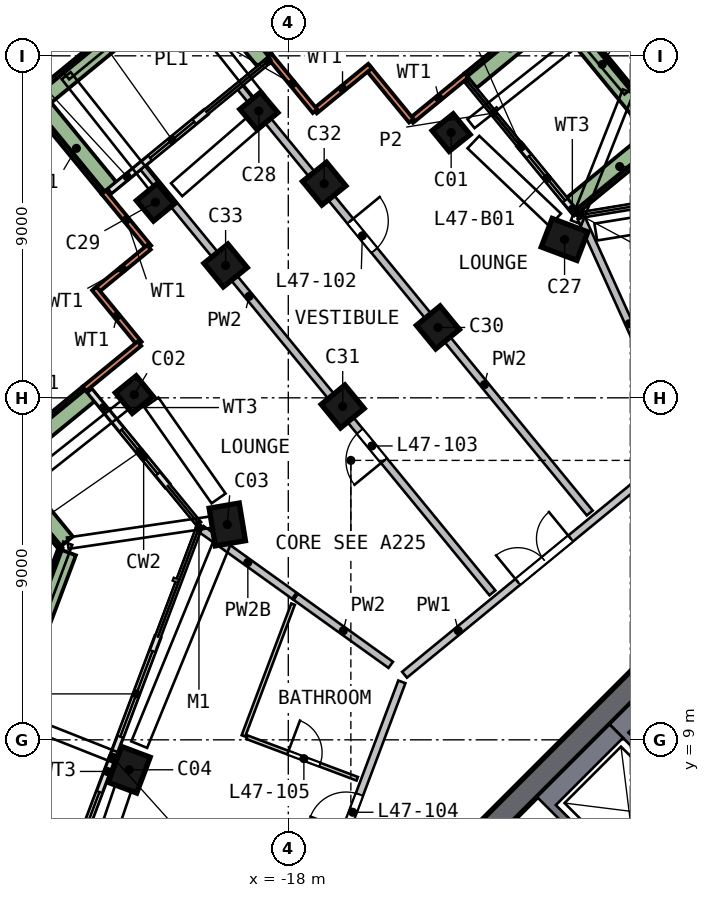
"""IFC4 building model, lengths in metres.
Left out: names, types, materials, properties, quantities, classifications, styles, units other than length and angle.
Written with IfcOpenShell. Run it as: python <this file> out.ifc"""

import sys

from ifc_helpers import new_model, si_unit, direction, frame, frame_2d, origin, origin_2d, place, context, subcontext, project, spatial, polyline, rectangle, outline, extrude, element, fill, save


model = new_model("IFC4")
c1 = context("Model", 3, precision=1e-05, world=origin(), true_north=direction((0.0, 1.0)))
c2 = subcontext(c1, "Body", "Model", "MODEL_VIEW")
j1 = project(units=[si_unit("LENGTHUNIT", "METRE"), si_unit("PLANEANGLEUNIT", "RADIAN")], contexts=[c1])
p1 = place(None, origin())
s1 = spatial("IfcSite", under=j1, at=p1, CompositionType="ELEMENT")
p2 = place(p1, origin())
s2 = spatial("IfcBuilding", under=s1, at=p2, CompositionType="ELEMENT")
p3 = place(p2, frame((0.0, 0.0, 194.0)))
s3 = spatial("IfcBuildingStorey", under=s2, at=p3, CompositionType="ELEMENT", Elevation=194.0)
p4 = place(p3, frame((-13.515, 24.992, 0.0), z_axis=(-0.163974568, -0.009965305, 0.98641423), x_axis=(-0.62120179, 0.777821307, -0.095406236)))
e1 = element("IfcColumn", 1, at=p4, inside=s3, PredefinedType="COLUMN", context=c2, shape_type="SweptSolid", body=[
    extrude(rectangle(XDim=0.7, YDim=0.7, at=origin_2d()), origin(), (0.0, 0.0, 1.0), 3.234),
])
p5 = place(p3, frame((-21.894, 18.145, 0.0), z_axis=(-0.131843016, -0.049479017, 0.990034972), x_axis=(0.628924315, -0.77616525, 0.044963447)))
e2 = element("IfcColumn", 2, at=p5, inside=s3, PredefinedType="COLUMN", context=c2, shape_type="SweptSolid", body=[
    extrude(rectangle(XDim=0.7, YDim=0.7, at=origin_2d()), origin(), (0.0, 0.0, 1.0), 3.222),
])
p6 = place(p3, frame((-19.521, 14.78, 0.0), z_axis=(-0.069476843, -0.093421269, 0.993199595), x_axis=(-0.169022074, 0.982313293, 0.080573769)))
e3 = element("IfcColumn", 3, at=p6, inside=s3, PredefinedType="COLUMN", context=c2, shape_type="SweptSolid", body=[
    extrude(rectangle(XDim=1.0, YDim=0.8, at=origin_2d()), origin(), (0.0, 0.0, 1.0), 3.212),
])
p7 = place(p3, frame((-22.14, 8.339, 0.0), z_axis=(-0.038784697, -0.105631262, 0.993648722), x_axis=(-0.350385276, -0.929821941, -0.112522514)))
e4 = element("IfcColumn", 4, at=p7, inside=s3, PredefinedType="COLUMN", context=c2, shape_type="SweptSolid", body=[
    extrude(rectangle(XDim=1.0, YDim=0.8, at=origin_2d()), origin(), (0.0, 0.0, 1.0), 3.21),
])
p8 = place(p3, frame((-10.603, 22.23, 0.0), z_axis=(-0.105270942, -0.051305333, 0.993119223), x_axis=(0.930381174, -0.35772673, 0.080140241)))
e5 = element("IfcColumn", 5, at=p8, inside=s3, PredefinedType="COLUMN", context=c2, shape_type="SweptSolid", body=[
    extrude(rectangle(XDim=1.0, YDim=0.8, at=origin_2d()), origin(), (0.0, 0.0, 1.0), 3.212),
])
p9 = place(p3, frame((-18.572, 25.591, 0.0), z_axis=(-0.166383559, -0.033865013, 0.985479412), x_axis=(-0.756669368, -0.636446663, -0.149623234)))
e6 = element("IfcColumn", 6, at=p9, inside=s3, PredefinedType="COLUMN", context=c2, shape_type="SweptSolid", body=[
    extrude(rectangle(XDim=0.7, YDim=0.7, at=origin_2d()), origin(), (0.0, 0.0, 1.0), 3.237),
])
p10 = place(p3, frame((-21.309, 23.204, 0.0), z_axis=(-0.155346071, -0.046747311, 0.986753408), x_axis=(-0.758462124, -0.634348104, -0.149457988)))
e7 = element("IfcColumn", 7, at=p10, inside=s3, PredefinedType="COLUMN", context=c2, shape_type="SweptSolid", body=[
    extrude(rectangle(XDim=0.7, YDim=0.7, at=origin_2d()), origin(), (0.0, 0.0, 1.0), 3.233),
])
for number, where, z_axis, x_axis in (
    (8, (-13.949, 19.933, 0.0), (-0.094, -0.067, 0.993), (-0.634, 0.774, -0.008)),
    (9, (-16.467, 17.868, 0.0), (-0.084, -0.079, 0.993), (-0.635, 0.773, 0.008)),
):
    element("IfcColumn", number, at=place(p3, frame(where, z_axis=z_axis, x_axis=x_axis)), inside=s3, PredefinedType="COLUMN", context=c2, shape_type="SweptSolid", body=[
        extrude(rectangle(XDim=0.8, YDim=0.8, at=origin_2d()), origin(), (0.0, 0.0, 1.0), 3.211),
    ])
p11 = place(p3, frame((-16.864, 23.667, 0.0), z_axis=(-0.157749477, -0.025762726, 0.987143041), x_axis=(-0.623531863, 0.777761167, -0.079344709)))
e10 = element("IfcColumn", 10, at=p11, inside=s3, PredefinedType="COLUMN", context=c2, shape_type="SweptSolid", body=[
    extrude(rectangle(XDim=0.8, YDim=0.8, at=origin_2d()), origin(), (0.0, 0.0, 1.0), 3.231),
])
p12 = place(p3, frame((-19.47, 21.53, 0.0), z_axis=(-0.147722608, -0.038046325, 0.988296771), x_axis=(-0.625986213, 0.777232529, -0.063646343)))
e11 = element("IfcColumn", 11, at=p12, inside=s3, PredefinedType="COLUMN", context=c2, shape_type="SweptSolid", body=[
    extrude(rectangle(XDim=0.8, YDim=0.8, at=origin_2d()), origin(), (0.0, 0.0, 1.0), 3.228),
])
p13 = place(p3, frame((-5.587, 13.788, 0.0), z_axis=(0.0, 0.0, 1.0), x_axis=(-0.707106781, -0.707106781, 0.0)))
e12 = element("IfcWall", 12, at=p13, inside=s3, PredefinedType="SHEAR", context=c2, shape_type="SweptSolid", body=[
    extrude(rectangle(XDim=11.598, YDim=0.6, at=frame_2d((5.799, 0.0))), origin(), (0.0, 0.0, 1.0), 3.5),
])
p14 = place(p3, frame((-13.315, 26.482, 0.0), z_axis=(0.0, 0.0, 1.0), x_axis=(-0.77315031, -0.63422283, 0.0)))
e13 = element("IfcWall", 13, at=p14, inside=s3, PredefinedType="SOLIDWALL", context=c2, shape_type="SweptSolid", body=[
    extrude(rectangle(XDim=1.875, YDim=0.15, at=frame_2d((0.938, 0.0))), origin(), (0.0, 0.0, 1.0), 3.19),
])
p15 = place(p3, frame((-14.764, 25.293, 0.0), z_axis=(0.0, 0.0, 1.0), x_axis=(-0.634175276, 0.773189317, 0.0)))
e14 = element("IfcWall", 14, at=p15, inside=s3, PredefinedType="SOLIDWALL", context=c2, shape_type="SweptSolid", body=[
    extrude(rectangle(XDim=1.8, YDim=0.15, at=frame_2d((0.9, 0.0))), origin(), (0.0, 0.0, 1.0), 3.19),
])
for number, where, z_axis, x_axis in (
    (15, (-15.848, 26.732, 0.0), (0.0, 0.0, 1.0), (-0.773, -0.634, 0.0)),
    (16, (-17.298, 25.543, 0.0), (0.0, 0.0, 1.0), (-0.634, 0.773, 0.0)),
    (17, (-22.855, 23.409, 0.0), (0.0, 0.0, 1.0), (0.634, -0.773, 0.0)),
):
    element("IfcWall", number, at=place(p3, frame(where, z_axis=z_axis, x_axis=x_axis)), inside=s3, PredefinedType="SOLIDWALL", context=c2, shape_type="SweptSolid", body=[
        extrude(rectangle(XDim=1.875, YDim=0.15, at=frame_2d((0.938, 0.0))), origin(), (0.0, 0.0, 1.0), 3.19),
    ])
p16 = place(p3, frame((-21.666, 21.96, 0.0), z_axis=(0.0, 0.0, 1.0), x_axis=(-0.773189317, -0.634175276, 0.0)))
e18 = element("IfcWall", 18, at=p16, inside=s3, PredefinedType="SOLIDWALL", context=c2, shape_type="SweptSolid", body=[
    extrude(rectangle(XDim=1.8, YDim=0.15, at=frame_2d((0.9, 0.0))), origin(), (0.0, 0.0, 1.0), 3.19),
])
for number, where, z_axis, x_axis in (
    (19, (-23.105, 20.876, 0.0), (0.0, 0.0, 1.0), (0.634, -0.773, 0.0)),
    (20, (-21.916, 19.427, 0.0), (0.0, 0.0, 1.0), (-0.773, -0.634, 0.0)),
):
    element("IfcWall", number, at=place(p3, frame(where, z_axis=z_axis, x_axis=x_axis)), inside=s3, PredefinedType="SOLIDWALL", context=c2, shape_type="SweptSolid", body=[
        extrude(rectangle(XDim=1.875, YDim=0.15, at=frame_2d((0.938, 0.0))), origin(), (0.0, 0.0, 1.0), 3.19),
    ])
p17 = place(p3, frame((-10.461, 22.885, 0.0), z_axis=(0.0, 0.0, 1.0), x_axis=(-0.634212662, 0.773158651, 0.0)))
e21 = element("IfcWall", 21, at=p17, inside=s3, PredefinedType="SOLIDWALL", context=c2, shape_type="SweptSolid", body=[
    extrude(rectangle(XDim=2.303, YDim=0.15, at=frame_2d((1.152, 0.0))), origin(), (0.0, 0.0, 1.0), 2.475),
])
p18 = place(p17, frame((0.404, 0.0, 0.0)))
e22 = element("IfcOpeningElement", 22, at=p18, cuts=e21, PredefinedType="OPENING", context=c2, shape_type="SweptSolid", body=[
    extrude(rectangle(XDim=1.5, YDim=2.4, at=frame_2d((0.75, 1.2))), frame((0.0, 0.085, 0.0), z_axis=(0.0, -1.0, 0.0), x_axis=(1.0, 0.0, 0.0)), (0.0, 0.0, 1.0), 0.17),
])
p19 = place(p3, frame((-20.167, 25.517, 0.0), z_axis=(0.0, 0.0, 1.0), x_axis=(-0.77314587, -0.634228242, 0.0)))
e23 = element("IfcWall", 23, at=p19, inside=s3, PredefinedType="SOLIDWALL", context=c2, shape_type="SweptSolid", body=[
    extrude(rectangle(XDim=3.26, YDim=0.15, at=frame_2d((1.63, 0.0))), origin(), (0.0, 0.0, 1.0), 2.475),
])
p20 = place(p19, frame((0.4, 0.0, 0.0)))
e24 = element("IfcOpeningElement", 24, at=p20, cuts=e23, PredefinedType="OPENING", context=c2, shape_type="SweptSolid", body=[
    extrude(rectangle(XDim=1.5, YDim=2.4, at=frame_2d((0.75, 1.2))), frame((0.0, 0.085, 0.0), z_axis=(0.0, -1.0, 0.0), x_axis=(1.0, 0.0, 0.0)), (0.0, 0.0, 1.0), 0.17),
])
p21 = place(p3, frame((-23.216, 18.173, 0.0), z_axis=(0.0, 0.0, 1.0), x_axis=(0.634210549, -0.773160384, 0.0)))
e25 = element("IfcWall", 25, at=p21, inside=s3, PredefinedType="SOLIDWALL", context=c2, shape_type="SweptSolid", body=[
    extrude(rectangle(XDim=3.21, YDim=0.15, at=frame_2d((1.605, 0.0))), origin(), (0.0, 0.0, 1.0), 2.475),
])
p22 = place(p21, frame((1.31, 0.0, 0.0)))
e26 = element("IfcOpeningElement", 26, at=p22, cuts=e25, PredefinedType="OPENING", context=c2, shape_type="SweptSolid", body=[
    extrude(rectangle(XDim=1.5, YDim=2.4, at=frame_2d((0.75, 1.2))), frame((0.0, 0.085, 0.0), z_axis=(0.0, -1.0, 0.0), x_axis=(1.0, 0.0, 0.0)), (0.0, 0.0, 1.0), 0.17),
])
p23 = place(p3, frame((-21.433, 11.706, 0.0), z_axis=(0.0, 0.0, 1.0), x_axis=(-0.35248439, -0.935817693, 0.0)))
e27 = element("IfcWall", 27, at=p23, inside=s3, PredefinedType="SOLIDWALL", context=c2, shape_type="SweptSolid", body=[
    extrude(rectangle(XDim=3.4, YDim=0.15, at=frame_2d((1.7, 0.0))), origin(), (0.0, 0.0, 1.0), 2.475),
])
p24 = place(p23, frame((0.4, 0.0, 0.0)))
e28 = element("IfcOpeningElement", 28, at=p24, cuts=e27, PredefinedType="OPENING", context=c2, shape_type="SweptSolid", body=[
    extrude(rectangle(XDim=2.4, YDim=2.4, at=frame_2d((1.2, 1.2))), frame((0.0, 0.085, 0.0), z_axis=(0.0, -1.0, 0.0), x_axis=(1.0, 0.0, 0.0)), (0.0, 0.0, 1.0), 0.17),
])
p25 = place(p3, frame((-22.631, 8.524, 0.0), z_axis=(0.0, 0.0, 1.0), x_axis=(-0.352524386, -0.935802627, 0.0)))
e29 = element("IfcWall", 29, at=p25, inside=s3, PredefinedType="SOLIDWALL", context=c2, shape_type="SweptSolid", body=[
    extrude(rectangle(XDim=3.761, YDim=0.15, at=frame_2d((1.881, 0.0))), origin(), (0.0, 0.0, 1.0), 2.475),
])
p26 = place(p25, frame((0.961, 0.0, 0.0)))
e30 = element("IfcOpeningElement", 30, at=p26, cuts=e29, PredefinedType="OPENING", context=c2, shape_type="SweptSolid", body=[
    extrude(rectangle(XDim=2.4, YDim=2.4, at=frame_2d((1.2, 1.2))), frame((0.0, 0.085, 0.0), z_axis=(0.0, -1.0, 0.0), x_axis=(1.0, 0.0, 0.0)), (0.0, 0.0, 1.0), 0.17),
])
p27 = place(p3, frame((-18.623, 26.882, 0.0), z_axis=(0.0, 0.0, 1.0), x_axis=(-0.634197315, 0.773171239, 0.0)))
e31 = element("IfcWall", 31, at=p27, inside=s3, PredefinedType="SOLIDWALL", context=c2, shape_type="SweptSolid", body=[
    extrude(rectangle(XDim=3.199, YDim=0.5, at=frame_2d((1.6, 0.0))), origin(), (0.0, 0.0, 1.0), 0.7),
])
p28 = place(p3, frame((-20.686, 29.004, 0.0), z_axis=(0.0, 0.0, 1.0), x_axis=(-0.773174724, -0.634193067, 0.0)))
e32 = element("IfcWall", 32, at=p28, inside=s3, PredefinedType="SOLIDWALL", context=c2, shape_type="SweptSolid", body=[
    extrude(rectangle(XDim=5.3, YDim=0.5, at=frame_2d((2.65, 0.0))), origin(), (0.0, 0.0, 1.0), 0.7),
])
p29 = place(p3, frame((-24.432, 25.608, 0.0), z_axis=(0.0, 0.0, 1.0), x_axis=(0.63421264, -0.773158669, 0.0)))
e33 = element("IfcWall", 33, at=p29, inside=s3, PredefinedType="SOLIDWALL", context=c2, shape_type="SweptSolid", body=[
    extrude(rectangle(XDim=2.699, YDim=0.5, at=frame_2d((1.35, 0.0))), origin(), (0.0, 0.0, 1.0), 0.7),
])
p30 = place(p3, frame((-23.256, 18.102, 0.0), z_axis=(0.0, 0.0, 1.0), x_axis=(-0.773171239, -0.634197315, 0.0)))
e34 = element("IfcWall", 34, at=p30, inside=s3, PredefinedType="SOLIDWALL", context=c2, shape_type="SweptSolid", body=[
    extrude(rectangle(XDim=3.199, YDim=0.5, at=frame_2d((1.6, 0.0))), origin(), (0.0, 0.0, 1.0), 0.7),
])
p31 = place(p3, frame((-25.377, 16.038, 0.0), z_axis=(0.0, 0.0, 1.0), x_axis=(0.634222613, -0.773150488, 0.0)))
e35 = element("IfcWall", 35, at=p31, inside=s3, PredefinedType="SOLIDWALL", context=c2, shape_type="SweptSolid", body=[
    extrude(rectangle(XDim=2.388, YDim=0.5, at=frame_2d((1.194, 0.0))), origin(), (0.0, 0.0, 1.0), 0.7),
])
p32 = place(p3, frame((-23.822, 13.945, 0.0), z_axis=(0.0, 0.0, 1.0), x_axis=(-0.352495325, -0.935813574, 0.0)))
e36 = element("IfcWall", 36, at=p32, inside=s3, PredefinedType="SOLIDWALL", context=c2, shape_type="SweptSolid", body=[
    extrude(rectangle(XDim=11.152, YDim=0.5, at=frame_2d((5.576, 0.0))), origin(), (0.0, 0.0, 1.0), 0.7),
])
p33 = place(p3, frame((-10.517, 23.072, 0.0), z_axis=(0.0, 0.0, 1.0), x_axis=(0.773171239, 0.634197315, 0.0)))
e37 = element("IfcWall", 37, at=p33, inside=s3, PredefinedType="SOLIDWALL", context=c2, shape_type="SweptSolid", body=[
    extrude(rectangle(XDim=3.199, YDim=0.5, at=frame_2d((1.6, 0.0))), origin(), (0.0, 0.0, 1.0), 0.7),
])
p34 = place(p3, frame((-8.395, 25.136, 0.0), z_axis=(0.0, 0.0, 1.0), x_axis=(-0.634200896, 0.773168302, 0.0)))
e38 = element("IfcWall", 38, at=p34, inside=s3, PredefinedType="SOLIDWALL", context=c2, shape_type="SweptSolid", body=[
    extrude(rectangle(XDim=4.236, YDim=0.5, at=frame_2d((2.118, 0.0))), origin(), (0.0, 0.0, 1.0), 0.7),
])
p35 = place(p3, frame((-11.116, 28.059, 0.0), z_axis=(0.0, 0.0, 1.0), x_axis=(-0.773195051, -0.634168285, 0.0)))
e39 = element("IfcWall", 39, at=p35, inside=s3, PredefinedType="SOLIDWALL", context=c2, shape_type="SweptSolid", body=[
    extrude(rectangle(XDim=2.699, YDim=0.5, at=frame_2d((1.35, 0.0))), origin(), (0.0, 0.0, 1.0), 0.7),
])
p36 = place(p3, origin())
e40 = element("IfcWall", 40, at=p36, inside=s3, PredefinedType="SOLIDWALL", context=c2, shape_type="SweptSolid", body=[
    extrude(outline(polyline([(-9.546, 9.405), (-7.495, 11.455), (-5.056, 9.016), (-5.197, 8.874), (-7.283, 10.96), (-9.051, 9.192), (-6.965, 7.106), (-7.106, 6.965), (-9.546, 9.405)])), origin(), (0.0, 0.0, 1.0), 3.19),
])
p37 = place(p3, origin())
e41 = element("IfcWall", 41, at=p37, inside=s3, PredefinedType="SOLIDWALL", context=c2, shape_type="SweptSolid", body=[
    extrude(outline(polyline([(-11.455, 7.495), (-9.546, 9.405), (-9.192, 9.051), (-10.96, 7.283), (-8.874, 5.197), (-9.016, 5.056), (-11.455, 7.495)])), origin(), (0.0, 0.0, 1.0), 3.19),
])
p38 = place(p3, frame((-7.036, 6.894, 0.0), z_axis=(0.0, 0.0, 1.0), x_axis=(-0.707106781, -0.707106781, 0.0)))
e42 = element("IfcWall", 42, at=p38, inside=s3, PredefinedType="SOLIDWALL", context=c2, shape_type="SweptSolid", body=[
    extrude(rectangle(XDim=2.7, YDim=0.2, at=frame_2d((1.35, 0.0))), origin(), (0.0, 0.0, 1.0), 3.19),
])
p39 = place(p38, frame((0.65, 0.0, 0.0)))
e43 = element("IfcOpeningElement", 43, at=p39, cuts=e42, PredefinedType="OPENING", context=c2, shape_type="SweptSolid", body=[
    extrude(rectangle(XDim=1.2, YDim=2.1, at=frame_2d((0.6, 1.05))), frame((0.0, 0.11, 0.0), z_axis=(0.0, -1.0, 0.0), x_axis=(1.0, 0.0, 0.0)), (0.0, 0.0, 1.0), 0.22),
])
p40 = place(p3, frame((-18.296, 1.807, 0.0), z_axis=(0.0, 0.0, 1.0), x_axis=(0.352510128, 0.935807998, 0.0)))
e44 = element("IfcWall", 44, at=p40, inside=s3, PredefinedType="SOLIDWALL", context=c2, shape_type="SweptSolid", body=[
    extrude(rectangle(XDim=9.317, YDim=0.2, at=frame_2d((4.658, 0.0))), origin(), (0.0, 0.0, 1.0), 3.19),
])
p41 = place(p40, frame((5.15, 0.0, 0.0)))
e45 = element("IfcOpeningElement", 45, at=p41, cuts=e44, PredefinedType="OPENING", context=c2, shape_type="SweptSolid", body=[
    extrude(rectangle(XDim=1.0, YDim=2.1, at=frame_2d((0.5, 1.05))), frame((0.0, 0.11, 0.0), z_axis=(0.0, -1.0, 0.0), x_axis=(1.0, 0.0, 0.0)), (0.0, 0.0, 1.0), 0.22),
])
p42 = place(p3, frame((-14.941, 10.713, 0.0), z_axis=(0.0, 0.0, 1.0), x_axis=(0.773179127, 0.634187699, 0.0)))
e46 = element("IfcWall", 46, at=p42, inside=s3, PredefinedType="SOLIDWALL", context=c2, shape_type="SweptSolid", body=[
    extrude(rectangle(XDim=9.317, YDim=0.2, at=frame_2d((4.658, 0.0))), origin(), (0.0, 0.0, 1.0), 3.19),
])
p43 = place(p42, frame((3.854, 0.0, 0.0)))
e47 = element("IfcOpeningElement", 47, at=p43, cuts=e46, PredefinedType="OPENING", context=c2, shape_type="SweptSolid", body=[
    extrude(rectangle(XDim=1.8, YDim=2.1, at=frame_2d((0.9, 1.05))), frame((0.0, 0.11, 0.0), z_axis=(0.0, -1.0, 0.0), x_axis=(1.0, 0.0, 0.0)), (0.0, 0.0, 1.0), 0.22),
])
p44 = place(p3, frame((-17.841, 12.792, 0.0), z_axis=(0.0, 0.0, 1.0), x_axis=(-0.812658436, 0.582740307, 0.0)))
e48 = element("IfcWall", 48, at=p44, inside=s3, PredefinedType="SOLIDWALL", context=c2, shape_type="SweptSolid", body=[
    extrude(rectangle(XDim=3.011, YDim=0.2, at=frame_2d((1.506, 0.0))), origin(), (0.0, 0.0, 1.0), 2.69),
])
p45 = place(p3, frame((-12.629, 12.868, 0.0), z_axis=(0.0, 0.0, 1.0), x_axis=(-0.634195474, 0.773172749, 0.0)))
e49 = element("IfcWall", 49, at=p45, inside=s3, PredefinedType="SOLIDWALL", context=c2, shape_type="SweptSolid", body=[
    extrude(rectangle(XDim=14.486, YDim=0.2, at=frame_2d((7.243, 0.0))), origin(), (0.0, 0.0, 1.0), 3.19),
])
p46 = place(p45, frame((4.5, 0.0, 0.0)))
e50 = element("IfcOpeningElement", 50, at=p46, cuts=e49, PredefinedType="OPENING", context=c2, shape_type="SweptSolid", body=[
    extrude(rectangle(XDim=1.0, YDim=2.1, at=frame_2d((0.5, 1.05))), frame((0.0, 0.11, 0.0), z_axis=(0.0, -1.0, 0.0), x_axis=(1.0, 0.0, 0.0)), (0.0, 0.0, 1.0), 0.22),
])
p47 = place(p3, frame((-15.305, 10.973, 0.0), z_axis=(0.0, 0.0, 1.0), x_axis=(-0.812669855, 0.582724383, 0.0)))
e51 = element("IfcWall", 51, at=p47, inside=s3, PredefinedType="SOLIDWALL", context=c2, shape_type="SweptSolid", body=[
    extrude(rectangle(XDim=3.075, YDim=0.2, at=frame_2d((1.537, 0.0))), origin(), (0.0, 0.0, 1.0), 3.19),
])
p48 = place(p3, frame((-19.254, 26.169, 0.0), z_axis=(0.0, 0.0, 1.0), x_axis=(0.63418721, -0.773179528, 0.0)))
e52 = element("IfcWall", 52, at=p48, inside=s3, PredefinedType="SOLIDWALL", context=c2, shape_type="SweptSolid", body=[
    extrude(rectangle(XDim=14.486, YDim=0.2, at=frame_2d((7.243, 0.0))), origin(), (0.0, 0.0, 1.0), 3.19),
])
p49 = place(p48, frame((4.55, 0.0, 0.0)))
e53 = element("IfcOpeningElement", 53, at=p49, cuts=e52, PredefinedType="OPENING", context=c2, shape_type="SweptSolid", body=[
    extrude(rectangle(XDim=1.0, YDim=2.1, at=frame_2d((0.5, 1.05))), frame((0.0, 0.11, 0.0), z_axis=(0.0, -1.0, 0.0), x_axis=(1.0, 0.0, 0.0)), (0.0, 0.0, 1.0), 0.22),
])
p50 = place(p3, frame((-10.297, 22.742, 0.0), z_axis=(0.0, 0.0, 1.0), x_axis=(0.412467657, -0.910972245, 0.0)))
e54 = element("IfcWall", 54, at=p50, inside=s3, PredefinedType="SOLIDWALL", context=c2, shape_type="SweptSolid", body=[
    extrude(rectangle(XDim=6.132, YDim=0.2, at=frame_2d((3.066, 0.0))), origin(), (0.0, 0.0, 1.0), 3.19),
])
p51 = place(p3, frame((-19.18, 9.104, 0.0), z_axis=(0.0, 0.0, 1.0), x_axis=(0.352517215, 0.935805329, 0.0)))
e55 = element("IfcWall", 55, at=p51, inside=s3, PredefinedType="PARTITIONING", context=c2, shape_type="SweptSolid", body=[
    extrude(rectangle(XDim=3.704, YDim=0.1, at=frame_2d((1.852, 0.0))), origin(), (0.0, 0.0, 1.0), 3.19),
])
p52 = place(p3, frame((-19.087, 9.068, 0.0), z_axis=(0.0, 0.0, 1.0), x_axis=(0.935813585, -0.352495296, 0.0)))
e56 = element("IfcWall", 56, at=p52, inside=s3, PredefinedType="PARTITIONING", context=c2, shape_type="SweptSolid", body=[
    extrude(rectangle(XDim=3.1, YDim=0.1, at=frame_2d((1.55, 0.0))), origin(), (0.0, 0.0, 1.0), 3.19),
])
p53 = place(p52, frame((1.15, 0.0, 0.0)))
e57 = element("IfcOpeningElement", 57, at=p53, cuts=e56, PredefinedType="OPENING", context=c2, shape_type="SweptSolid", body=[
    extrude(rectangle(XDim=0.9, YDim=2.1, at=frame_2d((0.45, 1.05))), frame((0.0, 0.06, 0.0), z_axis=(0.0, -1.0, 0.0), x_axis=(1.0, 0.0, 0.0)), (0.0, 0.0, 1.0), 0.12),
])
p54 = place(p18, origin())
e58 = element("IfcDoor", 58, at=p54, inside=s3, OperationType="SLIDING_TO_LEFT", PredefinedType="DOOR", context=c2, shape_type="SweptSolid", body=[
    extrude(rectangle(XDim=1.5, YDim=2.4, at=frame_2d((0.75, 1.2))), frame((0.0, 0.025, 0.0), z_axis=(0.0, -1.0, 0.0), x_axis=(1.0, 0.0, 0.0)), (0.0, 0.0, 1.0), 0.05),
])
fill(e22, e58)
p55 = place(p20, origin())
e59 = element("IfcDoor", 59, at=p55, inside=s3, OperationType="SLIDING_TO_RIGHT", PredefinedType="DOOR", context=c2, shape_type="SweptSolid", body=[
    extrude(rectangle(XDim=1.5, YDim=2.4, at=frame_2d((0.75, 1.2))), frame((0.0, 0.025, 0.0), z_axis=(0.0, -1.0, 0.0), x_axis=(1.0, 0.0, 0.0)), (0.0, 0.0, 1.0), 0.05),
])
fill(e24, e59)
p56 = place(p22, origin())
e60 = element("IfcDoor", 60, at=p56, inside=s3, OperationType="SLIDING_TO_LEFT", PredefinedType="DOOR", context=c2, shape_type="SweptSolid", body=[
    extrude(rectangle(XDim=1.5, YDim=2.4, at=frame_2d((0.75, 1.2))), frame((0.0, 0.025, 0.0), z_axis=(0.0, -1.0, 0.0), x_axis=(1.0, 0.0, 0.0)), (0.0, 0.0, 1.0), 0.05),
])
fill(e26, e60)
p57 = place(p24, origin())
e61 = element("IfcDoor", 61, at=p57, inside=s3, OperationType="SLIDING_TO_RIGHT", PredefinedType="DOOR", context=c2, shape_type="SweptSolid", body=[
    extrude(rectangle(XDim=2.4, YDim=2.4, at=frame_2d((1.2, 1.2))), frame((0.0, 0.025, 0.0), z_axis=(0.0, -1.0, 0.0), x_axis=(1.0, 0.0, 0.0)), (0.0, 0.0, 1.0), 0.05),
])
fill(e28, e61)
p58 = place(p26, origin())
e62 = element("IfcDoor", 62, at=p58, inside=s3, OperationType="SLIDING_TO_LEFT", PredefinedType="DOOR", context=c2, shape_type="SweptSolid", body=[
    extrude(rectangle(XDim=2.4, YDim=2.4, at=frame_2d((1.2, 1.2))), frame((0.0, 0.025, 0.0), z_axis=(0.0, -1.0, 0.0), x_axis=(1.0, 0.0, 0.0)), (0.0, 0.0, 1.0), 0.05),
])
fill(e30, e62)
p59 = place(p43, origin())
e63 = element("IfcDoor", 63, at=p59, inside=s3, OperationType="DOUBLE_DOOR_SINGLE_SWING", PredefinedType="DOOR", context=c2, shape_type="SweptSolid", body=[
    extrude(rectangle(XDim=1.8, YDim=2.1, at=frame_2d((0.9, 1.05))), frame((0.0, 0.025, 0.0), z_axis=(0.0, -1.0, 0.0), x_axis=(1.0, 0.0, 0.0)), (0.0, 0.0, 1.0), 0.05),
])
fill(e47, e63)
p60 = place(p49, origin())
e64 = element("IfcDoor", 64, at=p60, inside=s3, OperationType="SINGLE_SWING_LEFT", PredefinedType="DOOR", context=c2, shape_type="SweptSolid", body=[
    extrude(rectangle(XDim=1.0, YDim=2.1, at=frame_2d((0.5, 1.05))), frame((0.0, 0.025, 0.0), z_axis=(0.0, -1.0, 0.0), x_axis=(1.0, 0.0, 0.0)), (0.0, 0.0, 1.0), 0.05),
])
fill(e53, e64)
p61 = place(p46, origin())
e65 = element("IfcDoor", 65, at=p61, inside=s3, OperationType="SINGLE_SWING_LEFT", PredefinedType="DOOR", context=c2, shape_type="SweptSolid", body=[
    extrude(rectangle(XDim=1.0, YDim=2.1, at=frame_2d((0.5, 1.05))), frame((0.0, 0.025, 0.0), z_axis=(0.0, -1.0, 0.0), x_axis=(1.0, 0.0, 0.0)), (0.0, 0.0, 1.0), 0.05),
])
fill(e50, e65)
p62 = place(p41, origin())
e66 = element("IfcDoor", 66, at=p62, inside=s3, OperationType="SINGLE_SWING_LEFT", PredefinedType="DOOR", context=c2, shape_type="SweptSolid", body=[
    extrude(rectangle(XDim=1.0, YDim=2.1, at=frame_2d((0.5, 1.05))), frame((0.0, 0.025, 0.0), z_axis=(0.0, -1.0, 0.0), x_axis=(1.0, 0.0, 0.0)), (0.0, 0.0, 1.0), 0.05),
])
fill(e45, e66)
p63 = place(p53, origin())
e67 = element("IfcDoor", 67, at=p63, inside=s3, OperationType="SINGLE_SWING_LEFT", PredefinedType="DOOR", context=c2, shape_type="SweptSolid", body=[
    extrude(rectangle(XDim=0.9, YDim=2.1, at=frame_2d((0.45, 1.05))), frame((0.0, 0.025, 0.0), z_axis=(0.0, -1.0, 0.0), x_axis=(1.0, 0.0, 0.0)), (0.0, 0.0, 1.0), 0.05),
])
fill(e57, e67)
save(model, sys.argv[1])
